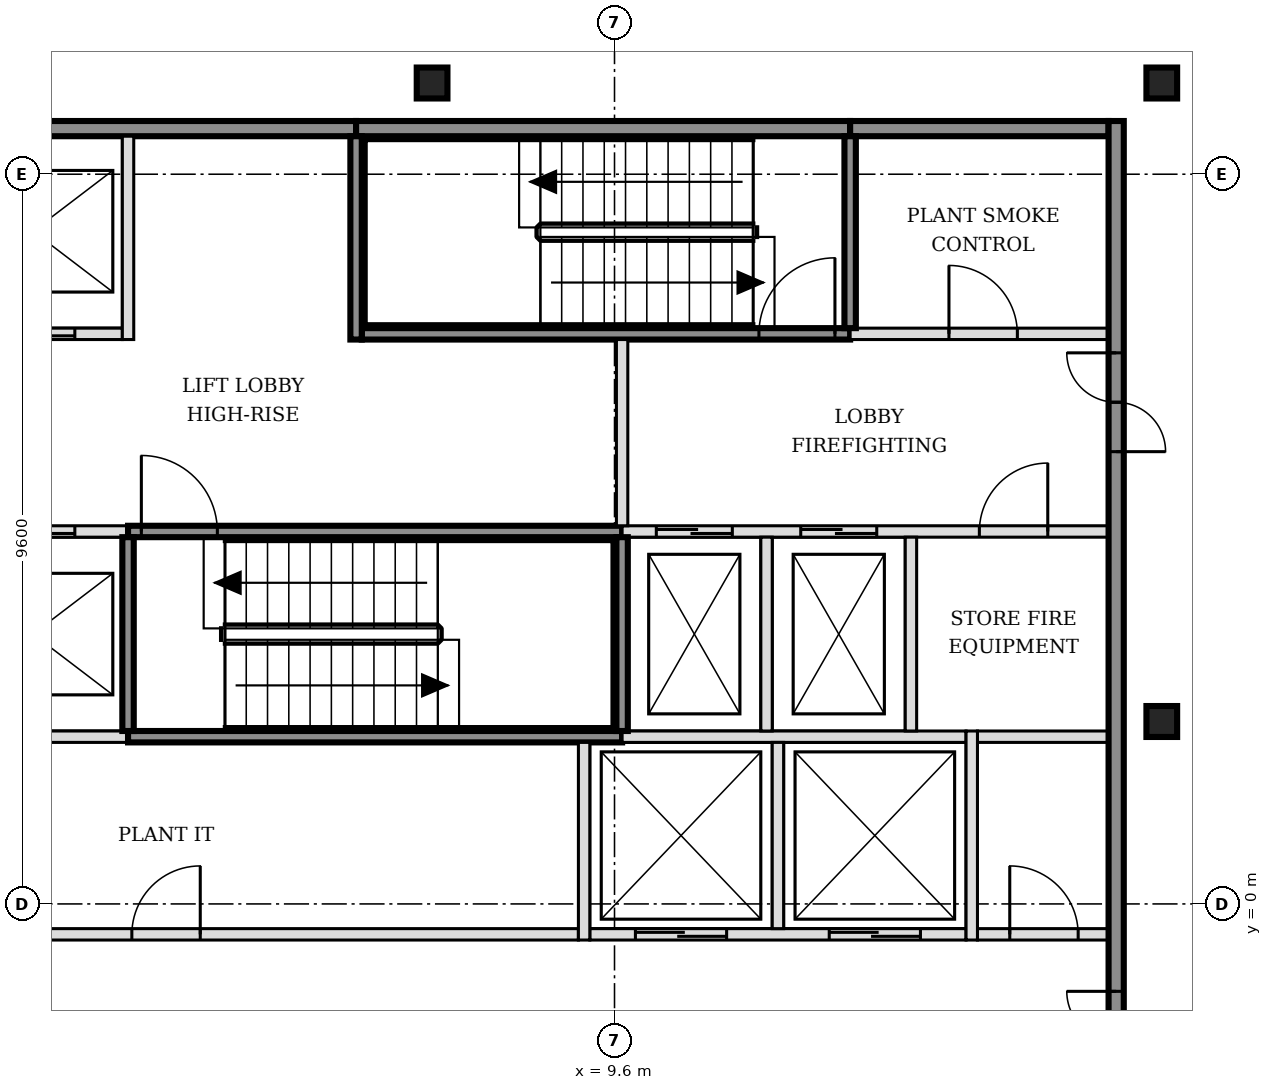
"""IFC4 building model, lengths in metres.
Left out: names, types, materials, properties, quantities, classifications, styles, units other than length and angle.
Written with IfcOpenShell. Run it as: python <this file> out.ifc"""

import sys

from ifc_helpers import new_model, si_unit, direction, frame, frame_2d, origin, origin_2d, place, context, subcontext, project, spatial, rectangle, i_section, extrude, element, fill, save


model = new_model("IFC4")
c1 = context("Model", 3, precision=1e-05, world=origin(), true_north=direction((0.0, 1.0)))
c2 = subcontext(c1, "Body", "Model", "MODEL_VIEW")
j1 = project(units=[si_unit("LENGTHUNIT", "METRE"), si_unit("PLANEANGLEUNIT", "RADIAN")], contexts=[c1])
p1 = place(None, origin())
s1 = spatial("IfcSite", under=j1, at=p1, CompositionType="ELEMENT")
p2 = place(p1, origin())
s2 = spatial("IfcBuilding", under=s1, at=p2, CompositionType="ELEMENT")
p3 = place(p2, frame((0.0, 0.0, 217.8)))
s3 = spatial("IfcBuildingStorey", under=s2, at=p3, CompositionType="ELEMENT", Elevation=217.8)
for number, where, z_axis, x_axis in (
    (1, (16.8, 2.4, -0.15), (0.0, 0.0, 1.0), (1.0, 0.0, 0.0)),
    (2, (7.2, 10.8, -0.15), (0.0, 0.0, 1.0), (1.0, 0.0, 0.0)),
    (3, (16.8, 10.8, -0.15), (0.0, 0.0, 1.0), (1.0, 0.0, 0.0)),
):
    element("IfcColumn", number, at=place(p3, frame(where, z_axis=z_axis, x_axis=x_axis)), inside=s3, PredefinedType="COLUMN", context=c2, shape_type="SweptSolid", body=[
        extrude(i_section(OverallWidth=0.404, OverallDepth=0.407, WebThickness=0.027, FlangeThickness=0.044, FilletRadius=0.015, at=origin_2d()), origin(), (0.0, 0.0, 1.0), 3.6),
    ])
p4 = place(p3, frame((-1.7, -0.4, 0.0), z_axis=(0.0, 0.0, 1.0), x_axis=(1.0, 0.0, 0.0)))
e4 = element("IfcWall", 4, at=p4, inside=s3, PredefinedType="PARTITIONING", context=c2, shape_type="SweptSolid", body=[
    extrude(rectangle(XDim=10.825, YDim=0.15, at=frame_2d((5.413, 0.0))), origin(), (0.0, 0.0, 1.0), 3.45),
])
p5 = place(p4, frame((4.95, 0.0, 0.0)))
e5 = element("IfcOpeningElement", 5, at=p5, cuts=e4, PredefinedType="OPENING", context=c2, shape_type="SweptSolid", body=[
    extrude(rectangle(XDim=0.9, YDim=2.1, at=frame_2d((0.45, 1.05))), frame((0.0, 0.085, 0.0), z_axis=(0.0, -1.0, 0.0), x_axis=(1.0, 0.0, 0.0)), (0.0, 0.0, 1.0), 0.17),
])
p6 = place(p3, frame((9.275, -0.4, 0.0), z_axis=(0.0, 0.0, 1.0), x_axis=(1.0, 0.0, 0.0)))
e6 = element("IfcWall", 6, at=p6, inside=s3, PredefinedType="SOLIDWALL", context=c2, shape_type="SweptSolid", body=[
    extrude(rectangle(XDim=4.95, YDim=0.15, at=frame_2d((2.475, 0.0))), origin(), (0.0, 0.0, 1.0), 3.45),
])
p7 = place(p6, frame((0.6, 0.0, 0.0)))
e7 = element("IfcOpeningElement", 7, at=p7, cuts=e6, PredefinedType="OPENING", context=c2, shape_type="SweptSolid", body=[
    extrude(rectangle(XDim=1.2, YDim=2.1, at=frame_2d((0.6, 1.05))), frame((0.0, 0.085, 0.0), z_axis=(0.0, -1.0, 0.0), x_axis=(1.0, 0.0, 0.0)), (0.0, 0.0, 1.0), 0.17),
])
p8 = place(p6, frame((3.15, 0.0, 0.0)))
e8 = element("IfcOpeningElement", 8, at=p8, cuts=e6, PredefinedType="OPENING", context=c2, shape_type="SweptSolid", body=[
    extrude(rectangle(XDim=1.2, YDim=2.1, at=frame_2d((0.6, 1.05))), frame((0.0, 0.085, 0.0), z_axis=(0.0, -1.0, 0.0), x_axis=(1.0, 0.0, 0.0)), (0.0, 0.0, 1.0), 0.17),
])
p9 = place(p3, frame((14.375, -0.4, 0.0), z_axis=(0.0, 0.0, 1.0), x_axis=(1.0, 0.0, 0.0)))
e9 = element("IfcWall", 9, at=p9, inside=s3, PredefinedType="PARTITIONING", context=c2, shape_type="SweptSolid", body=[
    extrude(rectangle(XDim=1.725, YDim=0.15, at=frame_2d((0.863, 0.0))), origin(), (0.0, 0.0, 1.0), 3.45),
])
p10 = place(p9, frame((0.425, 0.0, 0.0)))
e10 = element("IfcOpeningElement", 10, at=p10, cuts=e9, PredefinedType="OPENING", context=c2, shape_type="SweptSolid", body=[
    extrude(rectangle(XDim=0.9, YDim=2.1, at=frame_2d((0.45, 1.05))), frame((0.0, 0.085, 0.0), z_axis=(0.0, -1.0, 0.0), x_axis=(1.0, 0.0, 0.0)), (0.0, 0.0, 1.0), 0.17),
])
p11 = place(p3, frame((-1.7, 2.2, 0.0), z_axis=(0.0, 0.0, 1.0), x_axis=(1.0, 0.0, 0.0)))
e11 = element("IfcWall", 11, at=p11, inside=s3, PredefinedType="SOLIDWALL", context=c2, shape_type="SweptSolid", body=[
    extrude(rectangle(XDim=4.9, YDim=0.15, at=frame_2d((2.45, 0.0))), origin(), (0.0, 0.0, 1.0), 3.45),
])
p12 = place(p3, frame((3.2, 2.2, 0.0), z_axis=(0.0, 0.0, 1.0), x_axis=(1.0, 0.0, 0.0)))
e12 = element("IfcWall", 12, at=p12, inside=s3, PredefinedType="SOLIDWALL", context=c2, shape_type="SweptSolid", body=[
    extrude(rectangle(XDim=6.5, YDim=0.15, at=frame_2d((3.25, 0.0))), origin(), (0.0, 0.0, 1.0), 3.45),
])
p13 = place(p3, frame((9.7, 2.2, 0.0), z_axis=(0.0, 0.0, 1.0), x_axis=(1.0, 0.0, 0.0)))
e13 = element("IfcWall", 13, at=p13, inside=s3, PredefinedType="SOLIDWALL", context=c2, shape_type="SweptSolid", body=[
    extrude(rectangle(XDim=4.525, YDim=0.15, at=frame_2d((2.263, 0.0))), origin(), (0.0, 0.0, 1.0), 3.45),
])
p14 = place(p3, frame((14.375, 2.2, 0.0), z_axis=(0.0, 0.0, 1.0), x_axis=(1.0, 0.0, 0.0)))
e14 = element("IfcWall", 14, at=p14, inside=s3, PredefinedType="PARTITIONING", context=c2, shape_type="SweptSolid", body=[
    extrude(rectangle(XDim=1.725, YDim=0.15, at=frame_2d((0.863, 0.0))), origin(), (0.0, 0.0, 1.0), 3.45),
])
p15 = place(p3, frame((-1.7, 4.9, 0.0), z_axis=(0.0, 0.0, 1.0), x_axis=(1.0, 0.0, 0.0)))
e15 = element("IfcWall", 15, at=p15, inside=s3, PredefinedType="SOLIDWALL", context=c2, shape_type="SweptSolid", body=[
    extrude(rectangle(XDim=4.9, YDim=0.15, at=frame_2d((2.45, 0.0))), origin(), (0.0, 0.0, 1.0), 3.45),
])
p16 = place(p15, frame((0.6, 0.0, 0.0)))
e16 = element("IfcOpeningElement", 16, at=p16, cuts=e15, PredefinedType="OPENING", context=c2, shape_type="SweptSolid", body=[
    extrude(rectangle(XDim=1.1, YDim=2.1, at=frame_2d((0.55, 1.05))), frame((0.0, 0.085, 0.0), z_axis=(0.0, -1.0, 0.0), x_axis=(1.0, 0.0, 0.0)), (0.0, 0.0, 1.0), 0.17),
])
p17 = place(p15, frame((3.1, 0.0, 0.0)))
e17 = element("IfcOpeningElement", 17, at=p17, cuts=e15, PredefinedType="OPENING", context=c2, shape_type="SweptSolid", body=[
    extrude(rectangle(XDim=1.1, YDim=2.1, at=frame_2d((0.55, 1.05))), frame((0.0, 0.085, 0.0), z_axis=(0.0, -1.0, 0.0), x_axis=(1.0, 0.0, 0.0)), (0.0, 0.0, 1.0), 0.17),
])
p18 = place(p3, frame((3.2, 4.9, 0.0), z_axis=(0.0, 0.0, 1.0), x_axis=(1.0, 0.0, 0.0)))
e18 = element("IfcWall", 18, at=p18, inside=s3, PredefinedType="SOLIDWALL", context=c2, shape_type="SweptSolid", body=[
    extrude(rectangle(XDim=6.5, YDim=0.15, at=frame_2d((3.25, 0.0))), origin(), (0.0, 0.0, 1.0), 3.45),
])
p19 = place(p18, frame((0.175, 0.0, 0.0)))
e19 = element("IfcOpeningElement", 19, at=p19, cuts=e18, PredefinedType="OPENING", context=c2, shape_type="SweptSolid", body=[
    extrude(rectangle(XDim=1.0, YDim=2.1, at=frame_2d((0.5, 1.05))), frame((0.0, 0.085, 0.0), z_axis=(0.0, -1.0, 0.0), x_axis=(1.0, 0.0, 0.0)), (0.0, 0.0, 1.0), 0.17),
])
p20 = place(p3, frame((9.7, 4.9, 0.0), z_axis=(0.0, 0.0, 1.0), x_axis=(1.0, 0.0, 0.0)))
e20 = element("IfcWall", 20, at=p20, inside=s3, PredefinedType="SOLIDWALL", context=c2, shape_type="SweptSolid", body=[
    extrude(rectangle(XDim=6.4, YDim=0.15, at=frame_2d((3.2, 0.0))), origin(), (0.0, 0.0, 1.0), 3.45),
])
p21 = place(p20, frame((0.45, 0.0, 0.0)))
e21 = element("IfcOpeningElement", 21, at=p21, cuts=e20, PredefinedType="OPENING", context=c2, shape_type="SweptSolid", body=[
    extrude(rectangle(XDim=1.0, YDim=2.1, at=frame_2d((0.5, 1.05))), frame((0.0, 0.085, 0.0), z_axis=(0.0, -1.0, 0.0), x_axis=(1.0, 0.0, 0.0)), (0.0, 0.0, 1.0), 0.17),
])
p22 = place(p20, frame((2.35, 0.0, 0.0)))
e22 = element("IfcOpeningElement", 22, at=p22, cuts=e20, PredefinedType="OPENING", context=c2, shape_type="SweptSolid", body=[
    extrude(rectangle(XDim=1.0, YDim=2.1, at=frame_2d((0.5, 1.05))), frame((0.0, 0.085, 0.0), z_axis=(0.0, -1.0, 0.0), x_axis=(1.0, 0.0, 0.0)), (0.0, 0.0, 1.0), 0.17),
])
p23 = place(p20, frame((4.7, 0.0, 0.0)))
e23 = element("IfcOpeningElement", 23, at=p23, cuts=e20, PredefinedType="OPENING", context=c2, shape_type="SweptSolid", body=[
    extrude(rectangle(XDim=0.9, YDim=2.1, at=frame_2d((0.45, 1.05))), frame((0.0, 0.085, 0.0), z_axis=(0.0, -1.0, 0.0), x_axis=(1.0, 0.0, 0.0)), (0.0, 0.0, 1.0), 0.17),
])
p24 = place(p3, frame((-1.7, 7.5, 0.0), z_axis=(0.0, 0.0, 1.0), x_axis=(1.0, 0.0, 0.0)))
e24 = element("IfcWall", 24, at=p24, inside=s3, PredefinedType="SOLIDWALL", context=c2, shape_type="SweptSolid", body=[
    extrude(rectangle(XDim=4.825, YDim=0.15, at=frame_2d((2.413, 0.0))), origin(), (0.0, 0.0, 1.0), 3.45),
])
p25 = place(p24, frame((0.6, 0.0, 0.0)))
e25 = element("IfcOpeningElement", 25, at=p25, cuts=e24, PredefinedType="OPENING", context=c2, shape_type="SweptSolid", body=[
    extrude(rectangle(XDim=1.1, YDim=2.1, at=frame_2d((0.55, 1.05))), frame((0.0, 0.085, 0.0), z_axis=(0.0, -1.0, 0.0), x_axis=(1.0, 0.0, 0.0)), (0.0, 0.0, 1.0), 0.17),
])
p26 = place(p24, frame((3.1, 0.0, 0.0)))
e26 = element("IfcOpeningElement", 26, at=p26, cuts=e24, PredefinedType="OPENING", context=c2, shape_type="SweptSolid", body=[
    extrude(rectangle(XDim=1.1, YDim=2.1, at=frame_2d((0.55, 1.05))), frame((0.0, 0.085, 0.0), z_axis=(0.0, -1.0, 0.0), x_axis=(1.0, 0.0, 0.0)), (0.0, 0.0, 1.0), 0.17),
])
p27 = place(p3, frame((6.275, 7.5, 0.0), z_axis=(0.0, 0.0, 1.0), x_axis=(1.0, 0.0, 0.0)))
e27 = element("IfcWall", 27, at=p27, inside=s3, PredefinedType="SOLIDWALL", context=c2, shape_type="SweptSolid", body=[
    extrude(rectangle(XDim=6.425, YDim=0.15, at=frame_2d((3.212, 0.0))), origin(), (0.0, 0.0, 1.0), 3.45),
])
p28 = place(p27, frame((5.225, 0.0, 0.0)))
e28 = element("IfcOpeningElement", 28, at=p28, cuts=e27, PredefinedType="OPENING", context=c2, shape_type="SweptSolid", body=[
    extrude(rectangle(XDim=1.0, YDim=2.1, at=frame_2d((0.5, 1.05))), frame((0.0, 0.085, 0.0), z_axis=(0.0, -1.0, 0.0), x_axis=(1.0, 0.0, 0.0)), (0.0, 0.0, 1.0), 0.17),
])
p29 = place(p3, frame((12.7, 7.5, 0.0), z_axis=(0.0, 0.0, 1.0), x_axis=(1.0, 0.0, 0.0)))
e29 = element("IfcWall", 29, at=p29, inside=s3, PredefinedType="SOLIDWALL", context=c2, shape_type="SweptSolid", body=[
    extrude(rectangle(XDim=3.4, YDim=0.15, at=frame_2d((1.7, 0.0))), origin(), (0.0, 0.0, 1.0), 3.45),
])
p30 = place(p29, frame((1.3, 0.0, 0.0)))
e30 = element("IfcOpeningElement", 30, at=p30, cuts=e29, PredefinedType="OPENING", context=c2, shape_type="SweptSolid", body=[
    extrude(rectangle(XDim=0.9, YDim=2.1, at=frame_2d((0.45, 1.05))), frame((0.0, 0.085, 0.0), z_axis=(0.0, -1.0, 0.0), x_axis=(1.0, 0.0, 0.0)), (0.0, 0.0, 1.0), 0.17),
])
p31 = place(p3, frame((-1.7, 10.2, 0.0), z_axis=(0.0, 0.0, 1.0), x_axis=(1.0, 0.0, 0.0)))
e31 = element("IfcWall", 31, at=p31, inside=s3, PredefinedType="SOLIDWALL", context=c2, shape_type="SweptSolid", body=[
    extrude(rectangle(XDim=7.9, YDim=0.2, at=frame_2d((3.95, 0.0))), origin(), (0.0, 0.0, 1.0), 3.45),
])
p32 = place(p3, frame((6.2, 10.2, 0.0), z_axis=(0.0, 0.0, 1.0), x_axis=(1.0, 0.0, 0.0)))
e32 = element("IfcWall", 32, at=p32, inside=s3, PredefinedType="SOLIDWALL", context=c2, shape_type="SweptSolid", body=[
    extrude(rectangle(XDim=6.5, YDim=0.2, at=frame_2d((3.25, 0.0))), origin(), (0.0, 0.0, 1.0), 3.45),
])
p33 = place(p3, frame((12.7, 10.2, 0.0), z_axis=(0.0, 0.0, 1.0), x_axis=(1.0, 0.0, 0.0)))
e33 = element("IfcWall", 33, at=p33, inside=s3, PredefinedType="SOLIDWALL", context=c2, shape_type="SweptSolid", body=[
    extrude(rectangle(XDim=3.4, YDim=0.2, at=frame_2d((1.7, 0.0))), origin(), (0.0, 0.0, 1.0), 3.45),
])
p34 = place(p3, frame((3.2, 2.275, 0.0), z_axis=(0.0, 0.0, 1.0), x_axis=(0.0, 1.0, 0.0)))
e34 = element("IfcWall", 34, at=p34, inside=s3, PredefinedType="SOLIDWALL", context=c2, shape_type="SweptSolid", body=[
    extrude(rectangle(XDim=2.55, YDim=0.15, at=frame_2d((1.275, 0.0))), origin(), (0.0, 0.0, 1.0), 3.45),
])
for number, where, z_axis, x_axis in (
    (35, (3.2, 7.425, 0.0), (0.0, 0.0, 1.0), (0.0, 1.0, 0.0)),
    (36, (6.2, 7.425, 0.0), (0.0, 0.0, 1.0), (0.0, 1.0, 0.0)),
):
    element("IfcWall", number, at=place(p3, frame(where, z_axis=z_axis, x_axis=x_axis)), inside=s3, PredefinedType="SOLIDWALL", context=c2, shape_type="SweptSolid", body=[
        extrude(rectangle(XDim=2.675, YDim=0.15, at=frame_2d((1.337, 0.0))), origin(), (0.0, 0.0, 1.0), 3.45),
    ])
p35 = place(p3, frame((9.2, -0.475, 0.0), z_axis=(0.0, 0.0, 1.0), x_axis=(0.0, 1.0, 0.0)))
e37 = element("IfcWall", 37, at=p35, inside=s3, PredefinedType="SOLIDWALL", context=c2, shape_type="SweptSolid", body=[
    extrude(rectangle(XDim=2.6, YDim=0.15, at=frame_2d((1.3, 0.0))), origin(), (0.0, 0.0, 1.0), 3.45),
])
p36 = place(p3, frame((9.7, 2.275, 0.0), z_axis=(0.0, 0.0, 1.0), x_axis=(0.0, 1.0, 0.0)))
e38 = element("IfcWall", 38, at=p36, inside=s3, PredefinedType="SOLIDWALL", context=c2, shape_type="SweptSolid", body=[
    extrude(rectangle(XDim=2.55, YDim=0.15, at=frame_2d((1.275, 0.0))), origin(), (0.0, 0.0, 1.0), 3.45),
])
p37 = place(p3, frame((9.7, 4.975, 0.0), z_axis=(0.0, 0.0, 1.0), x_axis=(0.0, 1.0, 0.0)))
e39 = element("IfcWall", 39, at=p37, inside=s3, PredefinedType="SOLIDWALL", context=c2, shape_type="SweptSolid", body=[
    extrude(rectangle(XDim=2.45, YDim=0.15, at=frame_2d((1.225, 0.0))), origin(), (0.0, 0.0, 1.0), 3.45),
])
p38 = place(p3, frame((11.6, 2.275, 0.0), z_axis=(0.0, 0.0, 1.0), x_axis=(0.0, 1.0, 0.0)))
e40 = element("IfcWall", 40, at=p38, inside=s3, PredefinedType="SOLIDWALL", context=c2, shape_type="SweptSolid", body=[
    extrude(rectangle(XDim=2.55, YDim=0.15, at=frame_2d((1.275, 0.0))), origin(), (0.0, 0.0, 1.0), 3.45),
])
p39 = place(p3, frame((11.75, -0.325, 0.0), z_axis=(0.0, 0.0, 1.0), x_axis=(0.0, 1.0, 0.0)))
e41 = element("IfcWall", 41, at=p39, inside=s3, PredefinedType="SOLIDWALL", context=c2, shape_type="SweptSolid", body=[
    extrude(rectangle(XDim=2.45, YDim=0.15, at=frame_2d((1.225, 0.0))), origin(), (0.0, 0.0, 1.0), 3.45),
])
p40 = place(p3, frame((12.7, 7.575, 0.0), z_axis=(0.0, 0.0, 1.0), x_axis=(0.0, 1.0, 0.0)))
e42 = element("IfcWall", 42, at=p40, inside=s3, PredefinedType="SOLIDWALL", context=c2, shape_type="SweptSolid", body=[
    extrude(rectangle(XDim=2.525, YDim=0.15, at=frame_2d((1.263, 0.0))), origin(), (0.0, 0.0, 1.0), 3.45),
])
p41 = place(p3, frame((13.5, 2.275, 0.0), z_axis=(0.0, 0.0, 1.0), x_axis=(0.0, 1.0, 0.0)))
e43 = element("IfcWall", 43, at=p41, inside=s3, PredefinedType="SOLIDWALL", context=c2, shape_type="SweptSolid", body=[
    extrude(rectangle(XDim=2.55, YDim=0.15, at=frame_2d((1.275, 0.0))), origin(), (0.0, 0.0, 1.0), 3.45),
])
p42 = place(p3, frame((14.3, -0.475, 0.0), z_axis=(0.0, 0.0, 1.0), x_axis=(0.0, 1.0, 0.0)))
e44 = element("IfcWall", 44, at=p42, inside=s3, PredefinedType="SOLIDWALL", context=c2, shape_type="SweptSolid", body=[
    extrude(rectangle(XDim=2.75, YDim=0.15, at=frame_2d((1.375, 0.0))), origin(), (0.0, 0.0, 1.0), 3.45),
])
p43 = place(p3, frame((16.2, -5.5, 0.0), z_axis=(0.0, 0.0, 1.0), x_axis=(0.0, 1.0, 0.0)))
e45 = element("IfcWall", 45, at=p43, inside=s3, PredefinedType="SOLIDWALL", context=c2, shape_type="SweptSolid", body=[
    extrude(rectangle(XDim=15.8, YDim=0.2, at=frame_2d((7.9, 0.0))), origin(), (0.0, 0.0, 1.0), 3.45),
])
p44 = place(p43, frame((3.05, 0.0, 0.0)))
e46 = element("IfcOpeningElement", 46, at=p44, cuts=e45, PredefinedType="OPENING", context=c2, shape_type="SweptSolid", body=[
    extrude(rectangle(XDim=1.3, YDim=2.1, at=frame_2d((0.65, 1.05))), frame((0.0, 0.11, 0.0), z_axis=(0.0, -1.0, 0.0), x_axis=(1.0, 0.0, 0.0)), (0.0, 0.0, 1.0), 0.22),
])
p45 = place(p43, frame((11.45, 0.0, 0.0)))
e47 = element("IfcOpeningElement", 47, at=p45, cuts=e45, PredefinedType="OPENING", context=c2, shape_type="SweptSolid", body=[
    extrude(rectangle(XDim=1.3, YDim=2.1, at=frame_2d((0.65, 1.05))), frame((0.0, 0.11, 0.0), z_axis=(0.0, -1.0, 0.0), x_axis=(1.0, 0.0, 0.0)), (0.0, 0.0, 1.0), 0.22),
])
p46 = place(p7, origin())
e48 = element("IfcDoor", 48, at=p46, inside=s3, OperationType="DOUBLE_DOOR_SLIDING", PredefinedType="DOOR", context=c2, shape_type="SweptSolid", body=[
    extrude(rectangle(XDim=1.2, YDim=2.1, at=frame_2d((0.6, 1.05))), frame((0.0, 0.025, 0.0), z_axis=(0.0, -1.0, 0.0), x_axis=(1.0, 0.0, 0.0)), (0.0, 0.0, 1.0), 0.05),
])
fill(e7, e48)
p47 = place(p8, origin())
e49 = element("IfcDoor", 49, at=p47, inside=s3, OperationType="DOUBLE_DOOR_SLIDING", PredefinedType="DOOR", context=c2, shape_type="SweptSolid", body=[
    extrude(rectangle(XDim=1.2, YDim=2.1, at=frame_2d((0.6, 1.05))), frame((0.0, 0.025, 0.0), z_axis=(0.0, -1.0, 0.0), x_axis=(1.0, 0.0, 0.0)), (0.0, 0.0, 1.0), 0.05),
])
fill(e8, e49)
p48 = place(p17, origin())
e50 = element("IfcDoor", 50, at=p48, inside=s3, OperationType="DOUBLE_DOOR_SLIDING", PredefinedType="DOOR", context=c2, shape_type="SweptSolid", body=[
    extrude(rectangle(XDim=1.1, YDim=2.1, at=frame_2d((0.55, 1.05))), frame((0.0, 0.025, 0.0), z_axis=(0.0, -1.0, 0.0), x_axis=(1.0, 0.0, 0.0)), (0.0, 0.0, 1.0), 0.05),
])
fill(e17, e50)
p49 = place(p26, origin())
e51 = element("IfcDoor", 51, at=p49, inside=s3, OperationType="DOUBLE_DOOR_SLIDING", PredefinedType="DOOR", context=c2, shape_type="SweptSolid", body=[
    extrude(rectangle(XDim=1.1, YDim=2.1, at=frame_2d((0.55, 1.05))), frame((0.0, 0.025, 0.0), z_axis=(0.0, -1.0, 0.0), x_axis=(1.0, 0.0, 0.0)), (0.0, 0.0, 1.0), 0.05),
])
fill(e26, e51)
p50 = place(p21, origin())
e52 = element("IfcDoor", 52, at=p50, inside=s3, OperationType="DOUBLE_DOOR_SLIDING", PredefinedType="DOOR", context=c2, shape_type="SweptSolid", body=[
    extrude(rectangle(XDim=1.0, YDim=2.1, at=frame_2d((0.5, 1.05))), frame((0.0, 0.025, 0.0), z_axis=(0.0, -1.0, 0.0), x_axis=(1.0, 0.0, 0.0)), (0.0, 0.0, 1.0), 0.05),
])
fill(e21, e52)
p51 = place(p22, origin())
e53 = element("IfcDoor", 53, at=p51, inside=s3, OperationType="DOUBLE_DOOR_SLIDING", PredefinedType="DOOR", context=c2, shape_type="SweptSolid", body=[
    extrude(rectangle(XDim=1.0, YDim=2.1, at=frame_2d((0.5, 1.05))), frame((0.0, 0.025, 0.0), z_axis=(0.0, -1.0, 0.0), x_axis=(1.0, 0.0, 0.0)), (0.0, 0.0, 1.0), 0.05),
])
fill(e22, e53)
p52 = place(p19, origin())
e54 = element("IfcDoor", 54, at=p52, inside=s3, OperationType="SINGLE_SWING_LEFT", PredefinedType="DOOR", context=c2, shape_type="SweptSolid", body=[
    extrude(rectangle(XDim=1.0, YDim=2.1, at=frame_2d((0.5, 1.05))), frame((0.0, 0.025, 0.0), z_axis=(0.0, -1.0, 0.0), x_axis=(1.0, 0.0, 0.0)), (0.0, 0.0, 1.0), 0.05),
])
fill(e19, e54)
p53 = place(p28, origin())
e55 = element("IfcDoor", 55, at=p53, inside=s3, OperationType="SINGLE_SWING_RIGHT", PredefinedType="DOOR", context=c2, shape_type="SweptSolid", body=[
    extrude(rectangle(XDim=1.0, YDim=2.1, at=frame_2d((0.5, 1.05))), frame((0.0, 0.025, 0.0), z_axis=(0.0, -1.0, 0.0), x_axis=(1.0, 0.0, 0.0)), (0.0, 0.0, 1.0), 0.05),
])
fill(e28, e55)
p54 = place(p44, origin())
e56 = element("IfcDoor", 56, at=p54, inside=s3, OperationType="DOUBLE_DOOR_SINGLE_SWING", PredefinedType="DOOR", context=c2, shape_type="SweptSolid", body=[
    extrude(rectangle(XDim=1.3, YDim=2.1, at=frame_2d((0.65, 1.05))), frame((0.0, 0.025, 0.0), z_axis=(0.0, -1.0, 0.0), x_axis=(1.0, 0.0, 0.0)), (0.0, 0.0, 1.0), 0.05),
])
fill(e46, e56)
p55 = place(p45, origin())
e57 = element("IfcDoor", 57, at=p55, inside=s3, OperationType="DOUBLE_DOOR_SINGLE_SWING", PredefinedType="DOOR", context=c2, shape_type="SweptSolid", body=[
    extrude(rectangle(XDim=1.3, YDim=2.1, at=frame_2d((0.65, 1.05))), frame((0.0, 0.025, 0.0), z_axis=(0.0, -1.0, 0.0), x_axis=(1.0, 0.0, 0.0)), (0.0, 0.0, 1.0), 0.05),
])
fill(e47, e57)
p56 = place(p10, origin())
e58 = element("IfcDoor", 58, at=p56, inside=s3, OperationType="SINGLE_SWING_LEFT", PredefinedType="DOOR", context=c2, shape_type="SweptSolid", body=[
    extrude(rectangle(XDim=0.9, YDim=2.1, at=frame_2d((0.45, 1.05))), frame((0.0, 0.025, 0.0), z_axis=(0.0, -1.0, 0.0), x_axis=(1.0, 0.0, 0.0)), (0.0, 0.0, 1.0), 0.05),
])
fill(e10, e58)
p57 = place(p23, origin())
e59 = element("IfcDoor", 59, at=p57, inside=s3, OperationType="SINGLE_SWING_RIGHT", PredefinedType="DOOR", context=c2, shape_type="SweptSolid", body=[
    extrude(rectangle(XDim=0.9, YDim=2.1, at=frame_2d((0.45, 1.05))), frame((0.0, 0.025, 0.0), z_axis=(0.0, -1.0, 0.0), x_axis=(1.0, 0.0, 0.0)), (0.0, 0.0, 1.0), 0.05),
])
fill(e23, e59)
p58 = place(p30, origin())
e60 = element("IfcDoor", 60, at=p58, inside=s3, OperationType="SINGLE_SWING_LEFT", PredefinedType="DOOR", context=c2, shape_type="SweptSolid", body=[
    extrude(rectangle(XDim=0.9, YDim=2.1, at=frame_2d((0.45, 1.05))), frame((0.0, 0.025, 0.0), z_axis=(0.0, -1.0, 0.0), x_axis=(1.0, 0.0, 0.0)), (0.0, 0.0, 1.0), 0.05),
])
fill(e30, e60)
p59 = place(p5, origin())
e61 = element("IfcDoor", 61, at=p59, inside=s3, OperationType="SINGLE_SWING_RIGHT", PredefinedType="DOOR", context=c2, shape_type="SweptSolid", body=[
    extrude(rectangle(XDim=0.9, YDim=2.1, at=frame_2d((0.45, 1.05))), frame((0.0, 0.025, 0.0), z_axis=(0.0, -1.0, 0.0), x_axis=(1.0, 0.0, 0.0)), (0.0, 0.0, 1.0), 0.05),
])
fill(e5, e61)
save(model, sys.argv[1])
